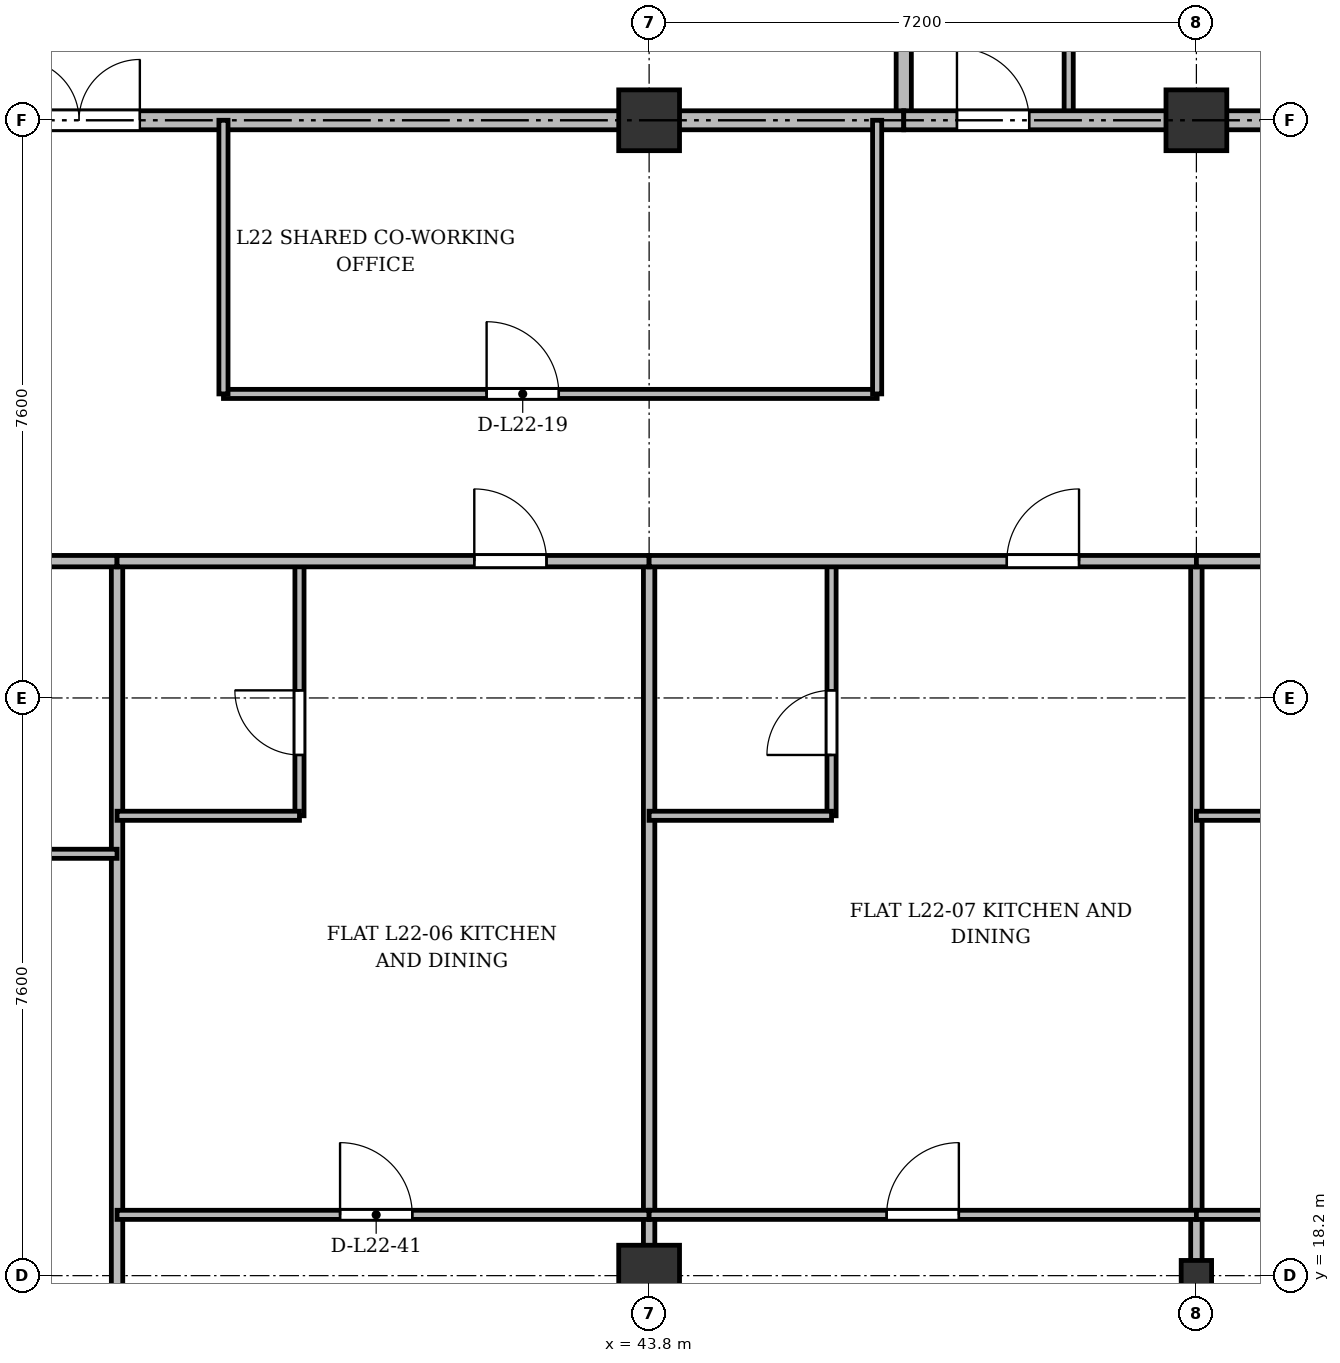
"""IFC4 building model, lengths in metres.
Left out: names, types, materials, properties, quantities, classifications, styles, units other than length and angle.
Written with IfcOpenShell. Run it as: python <this file> out.ifc"""

import sys

from ifc_helpers import new_model, si_unit, direction, frame, frame_2d, origin, origin_2d, place, context, subcontext, project, spatial, rectangle, i_section, extrude, source, transform, mapped, element, fill, save


model = new_model("IFC4")
c1 = context("Model", 3, precision=1e-05, world=origin(), true_north=direction((0.0, 1.0)))
c2 = subcontext(c1, "Body", "Model", "MODEL_VIEW")
j1 = project(units=[si_unit("LENGTHUNIT", "METRE"), si_unit("PLANEANGLEUNIT", "RADIAN")], contexts=[c1])
p1 = place(None, origin())
s1 = spatial("IfcSite", under=j1, at=p1, CompositionType="ELEMENT")
p2 = place(p1, origin())
s2 = spatial("IfcBuilding", under=s1, at=p2, CompositionType="ELEMENT")
p3 = place(p2, frame((0.0, 0.0, 88.9)))
s3 = spatial("IfcBuildingStorey", under=s2, at=p3, CompositionType="ELEMENT", Elevation=88.9)
m1 = source(origin(), c2, "Body", "SweptSolid", [
    extrude(rectangle(XDim=0.8, YDim=0.8, at=origin_2d()), origin(), (0.0, 0.0, 1.0), 3.6),
])
for number, where, z_axis, x_axis in (
    (1, (43.8, 18.2, 0.0), (0.0, 0.0, 1.0), (1.0, 0.0, 0.0)),
    (2, (43.8, 33.4, 0.0), (0.0, 0.0, 1.0), (1.0, 0.0, 0.0)),
):
    element("IfcColumn", number, at=place(p3, frame(where, z_axis=z_axis, x_axis=x_axis)), inside=s3, PredefinedType="COLUMN", context=c2, shape_type="MappedRepresentation", body=[
        mapped(m1, transform((0.0, 0.0, 0.0), x_axis=(1.0, 0.0, 0.0), y_axis=(0.0, 1.0, 0.0), z_axis=(0.0, 0.0, 1.0), scale=1.0)),
    ])
m2 = source(origin(), c2, "Body", "SweptSolid", [
    extrude(i_section(OverallWidth=0.4, OverallDepth=0.4, WebThickness=0.022, FlangeThickness=0.035, at=origin_2d()), origin(), (0.0, 0.0, 1.0), 3.6),
])
p4 = place(p3, frame((51.0, 18.2, 0.0), z_axis=(0.0, 0.0, 1.0), x_axis=(1.0, 0.0, 0.0)))
e3 = element("IfcColumn", 3, at=p4, inside=s3, PredefinedType="COLUMN", context=c2, shape_type="MappedRepresentation", body=[
    mapped(m2, transform((0.0, 0.0, 0.0), x_axis=(1.0, 0.0, 0.0), y_axis=(0.0, 1.0, 0.0), z_axis=(0.0, 0.0, 1.0), scale=1.0)),
])
p5 = place(p3, frame((51.0, 33.4, 0.0), z_axis=(0.0, 0.0, 1.0), x_axis=(1.0, 0.0, 0.0)))
e4 = element("IfcColumn", 4, at=p5, inside=s3, PredefinedType="COLUMN", context=c2, shape_type="MappedRepresentation", body=[
    mapped(m1, transform((0.0, 0.0, 0.0), x_axis=(1.0, 0.0, 0.0), y_axis=(0.0, 1.0, 0.0), z_axis=(0.0, 0.0, 1.0), scale=1.0)),
])
p6 = place(p3, frame((47.15, 33.4, 0.0), z_axis=(0.0, 0.0, 1.0), x_axis=(0.0, 1.0, 0.0)))
e5 = element("IfcWall", 5, at=p6, inside=s3, PredefinedType="SOLIDWALL", context=c2, shape_type="SweptSolid", body=[
    extrude(rectangle(XDim=11.3, YDim=0.2, at=frame_2d((5.65, 0.0))), origin(), (0.0, 0.0, 1.0), 2.752),
])
p7 = place(p3, frame((26.3, 33.4, 0.0), z_axis=(0.0, 0.0, 1.0), x_axis=(1.0, 0.0, 0.0)))
e6 = element("IfcWall", 6, at=p7, inside=s3, PredefinedType="PARTITIONING", context=c2, shape_type="SweptSolid", body=[
    extrude(rectangle(XDim=20.85, YDim=0.25, at=frame_2d((10.425, 0.0))), origin(), (0.0, 0.0, 1.0), 2.752),
])
p8 = place(p7, frame((9.2, 0.0, 0.0)))
e7 = element("IfcOpeningElement", 7, at=p8, cuts=e6, PredefinedType="OPENING", context=c2, shape_type="SweptSolid", body=[
    extrude(rectangle(XDim=1.6, YDim=2.2, at=frame_2d((0.8, 1.1))), frame((0.0, 0.135, 0.0), z_axis=(0.0, -1.0, 0.0), x_axis=(1.0, 0.0, 0.0)), (0.0, 0.0, 1.0), 0.27),
])
p9 = place(p3, frame((49.32, 33.4, 0.0), z_axis=(0.0, 0.0, 1.0), x_axis=(0.0, 1.0, 0.0)))
e8 = element("IfcWall", 8, at=p9, inside=s3, PredefinedType="PARTITIONING", context=c2, shape_type="SweptSolid", body=[
    extrude(rectangle(XDim=5.42, YDim=0.12, at=frame_2d((2.71, 0.0))), origin(), (0.0, 0.0, 1.0), 2.752),
])
p10 = place(p9, frame((1.6, 0.0, 0.0)))
e9 = element("IfcOpeningElement", 9, at=p10, cuts=e8, PredefinedType="OPENING", context=c2, shape_type="SweptSolid", body=[
    extrude(rectangle(XDim=0.95, YDim=2.15, at=frame_2d((0.475, 1.075))), frame((0.0, 0.07, 0.0), z_axis=(0.0, -1.0, 0.0), x_axis=(1.0, 0.0, 0.0)), (0.0, 0.0, 1.0), 0.14),
])
p11 = place(p3, frame((47.15, 33.4, 0.0), z_axis=(0.0, 0.0, 1.0), x_axis=(1.0, 0.0, 0.0)))
e10 = element("IfcWall", 10, at=p11, inside=s3, PredefinedType="PARTITIONING", context=c2, shape_type="SweptSolid", body=[
    extrude(rectangle(XDim=11.15, YDim=0.25, at=frame_2d((5.575, 0.0))), origin(), (0.0, 0.0, 1.0), 2.752),
])
p12 = place(p11, frame((0.7, 0.0, 0.0)))
e11 = element("IfcOpeningElement", 11, at=p12, cuts=e10, PredefinedType="OPENING", context=c2, shape_type="SweptSolid", body=[
    extrude(rectangle(XDim=0.95, YDim=2.15, at=frame_2d((0.475, 1.075))), frame((0.0, 0.135, 0.0), z_axis=(0.0, -1.0, 0.0), x_axis=(1.0, 0.0, 0.0)), (0.0, 0.0, 1.0), 0.27),
])
p13 = place(p11, frame((6.0, 0.0, 0.0)))
e12 = element("IfcOpeningElement", 12, at=p13, cuts=e10, PredefinedType="OPENING", context=c2, shape_type="SweptSolid", body=[
    extrude(rectangle(XDim=1.2, YDim=2.15, at=frame_2d((0.6, 1.075))), frame((0.0, 0.135, 0.0), z_axis=(0.0, -1.0, 0.0), x_axis=(1.0, 0.0, 0.0)), (0.0, 0.0, 1.0), 0.27),
])
p14 = place(p3, frame((38.2, 29.8, 0.0), z_axis=(0.0, 0.0, 1.0), x_axis=(1.0, 0.0, 0.0)))
e13 = element("IfcWall", 13, at=p14, inside=s3, PredefinedType="PARTITIONING", context=c2, shape_type="SweptSolid", body=[
    extrude(rectangle(XDim=8.6, YDim=0.12, at=frame_2d((4.3, 0.0))), origin(), (0.0, 0.0, 1.0), 2.84),
])
p15 = place(p14, frame((3.462, 0.0, 0.0)))
e14 = element("IfcOpeningElement", 14, at=p15, cuts=e13, PredefinedType="OPENING", context=c2, shape_type="SweptSolid", body=[
    extrude(rectangle(XDim=0.95, YDim=2.15, at=frame_2d((0.475, 1.075))), frame((0.0, 0.07, 0.0), z_axis=(0.0, -1.0, 0.0), x_axis=(1.0, 0.0, 0.0)), (0.0, 0.0, 1.0), 0.14),
])
for number, where, z_axis, x_axis in (
    (15, (38.2, 29.8, 0.0), (0.0, 0.0, 1.0), (0.0, 1.0, 0.0)),
    (16, (46.8, 29.8, 0.0), (0.0, 0.0, 1.0), (0.0, 1.0, 0.0)),
):
    element("IfcWall", number, at=place(p3, frame(where, z_axis=z_axis, x_axis=x_axis)), inside=s3, PredefinedType="PARTITIONING", context=c2, shape_type="SweptSolid", body=[
        extrude(rectangle(XDim=3.6, YDim=0.12, at=frame_2d((1.8, 0.0))), origin(), (0.0, 0.0, 1.0), 2.752),
    ])
p16 = place(p3, frame((36.8, 3.145, 0.0), z_axis=(0.0, 0.0, 1.0), x_axis=(0.0, 1.0, 0.0)))
e17 = element("IfcWall", 17, at=p16, inside=s3, PredefinedType="PARTITIONING", context=c2, shape_type="SweptSolid", body=[
    extrude(rectangle(XDim=24.455, YDim=0.15, at=frame_2d((12.228, 0.0))), origin(), (0.0, 0.0, 1.0), 2.752),
])
for number, where, z_axis, x_axis in (
    (18, (43.8, 3.145, 0.0), (0.0, 0.0, 1.0), (0.0, 1.0, 0.0)),
    (19, (51.0, 3.145, 0.0), (0.0, 0.0, 1.0), (0.0, 1.0, 0.0)),
):
    element("IfcWall", number, at=place(p3, frame(where, z_axis=z_axis, x_axis=x_axis)), inside=s3, PredefinedType="PARTITIONING", context=c2, shape_type="SweptSolid", body=[
        extrude(rectangle(XDim=24.455, YDim=0.15, at=frame_2d((12.228, 0.0))), origin(), (0.0, 0.0, 1.0), 2.84),
    ])
p17 = place(p3, frame((30.6, 27.6, 0.0), z_axis=(0.0, 0.0, 1.0), x_axis=(1.0, 0.0, 0.0)))
e20 = element("IfcWall", 20, at=p17, inside=s3, PredefinedType="PARTITIONING", context=c2, shape_type="SweptSolid", body=[
    extrude(rectangle(XDim=6.2, YDim=0.15, at=frame_2d((3.1, 0.0))), origin(), (0.0, 0.0, 1.0), 2.84),
])
p18 = place(p17, frame((2.625, 0.0, 0.0)))
e21 = element("IfcOpeningElement", 21, at=p18, cuts=e20, PredefinedType="OPENING", context=c2, shape_type="SweptSolid", body=[
    extrude(rectangle(XDim=0.95, YDim=2.15, at=frame_2d((0.475, 1.075))), frame((0.0, 0.085, 0.0), z_axis=(0.0, -1.0, 0.0), x_axis=(1.0, 0.0, 0.0)), (0.0, 0.0, 1.0), 0.17),
])
p19 = place(p3, frame((30.6, 23.75, 0.0), z_axis=(0.0, 0.0, 1.0), x_axis=(1.0, 0.0, 0.0)))
e22 = element("IfcWall", 22, at=p19, inside=s3, PredefinedType="PARTITIONING", context=c2, shape_type="SweptSolid", body=[
    extrude(rectangle(XDim=6.2, YDim=0.12, at=frame_2d((3.1, 0.0))), origin(), (0.0, 0.0, 1.0), 2.84),
])
p20 = place(p19, frame((2.625, 0.0, 0.0)))
e23 = element("IfcOpeningElement", 23, at=p20, cuts=e22, PredefinedType="OPENING", context=c2, shape_type="SweptSolid", body=[
    extrude(rectangle(XDim=0.95, YDim=2.15, at=frame_2d((0.475, 1.075))), frame((0.0, 0.07, 0.0), z_axis=(0.0, -1.0, 0.0), x_axis=(1.0, 0.0, 0.0)), (0.0, 0.0, 1.0), 0.14),
])
p21 = place(p3, frame((36.8, 19.0, 0.0), z_axis=(0.0, 0.0, 1.0), x_axis=(1.0, 0.0, 0.0)))
e24 = element("IfcWall", 24, at=p21, inside=s3, PredefinedType="PARTITIONING", context=c2, shape_type="SweptSolid", body=[
    extrude(rectangle(XDim=7.0, YDim=0.12, at=frame_2d((3.5, 0.0))), origin(), (0.0, 0.0, 1.0), 2.84),
])
p22 = place(p21, frame((2.934, 0.0, 0.0)))
e25 = element("IfcOpeningElement", 25, at=p22, cuts=e24, PredefinedType="OPENING", context=c2, shape_type="SweptSolid", body=[
    extrude(rectangle(XDim=0.95, YDim=2.15, at=frame_2d((0.475, 1.075))), frame((0.0, 0.07, 0.0), z_axis=(0.0, -1.0, 0.0), x_axis=(1.0, 0.0, 0.0)), (0.0, 0.0, 1.0), 0.14),
])
p23 = place(p3, frame((39.2, 24.25, 0.0), z_axis=(0.0, 0.0, 1.0), x_axis=(0.0, 1.0, 0.0)))
e26 = element("IfcWall", 26, at=p23, inside=s3, PredefinedType="PARTITIONING", context=c2, shape_type="SweptSolid", body=[
    extrude(rectangle(XDim=3.35, YDim=0.12, at=frame_2d((1.675, 0.0))), origin(), (0.0, 0.0, 1.0), 2.99),
])
p24 = place(p23, frame((0.8, 0.0, 0.0)))
e27 = element("IfcOpeningElement", 27, at=p24, cuts=e26, PredefinedType="OPENING", context=c2, shape_type="SweptSolid", body=[
    extrude(rectangle(XDim=0.85, YDim=2.1, at=frame_2d((0.425, 1.05))), frame((0.0, 0.07, 0.0), z_axis=(0.0, -1.0, 0.0), x_axis=(1.0, 0.0, 0.0)), (0.0, 0.0, 1.0), 0.14),
])
p25 = place(p3, frame((36.8, 24.25, 0.0), z_axis=(0.0, 0.0, 1.0), x_axis=(1.0, 0.0, 0.0)))
e28 = element("IfcWall", 28, at=p25, inside=s3, PredefinedType="PARTITIONING", context=c2, shape_type="SweptSolid", body=[
    extrude(rectangle(XDim=2.4, YDim=0.12, at=frame_2d((1.2, 0.0))), origin(), (0.0, 0.0, 1.0), 3.34),
])
p26 = place(p3, frame((36.8, 27.6, 0.0), z_axis=(0.0, 0.0, 1.0), x_axis=(1.0, 0.0, 0.0)))
e29 = element("IfcWall", 29, at=p26, inside=s3, PredefinedType="PARTITIONING", context=c2, shape_type="SweptSolid", body=[
    extrude(rectangle(XDim=7.0, YDim=0.15, at=frame_2d((3.5, 0.0))), origin(), (0.0, 0.0, 1.0), 2.84),
])
p27 = place(p26, frame((4.7, 0.0, 0.0)))
e30 = element("IfcOpeningElement", 30, at=p27, cuts=e29, PredefinedType="OPENING", context=c2, shape_type="SweptSolid", body=[
    extrude(rectangle(XDim=0.95, YDim=2.15, at=frame_2d((0.475, 1.075))), frame((0.0, 0.085, 0.0), z_axis=(0.0, -1.0, 0.0), x_axis=(1.0, 0.0, 0.0)), (0.0, 0.0, 1.0), 0.17),
])
p28 = place(p3, frame((43.8, 19.0, 0.0), z_axis=(0.0, 0.0, 1.0), x_axis=(1.0, 0.0, 0.0)))
e31 = element("IfcWall", 31, at=p28, inside=s3, PredefinedType="PARTITIONING", context=c2, shape_type="SweptSolid", body=[
    extrude(rectangle(XDim=7.2, YDim=0.12, at=frame_2d((3.6, 0.0))), origin(), (0.0, 0.0, 1.0), 2.84),
])
p29 = place(p28, frame((3.125, 0.0, 0.0)))
e32 = element("IfcOpeningElement", 32, at=p29, cuts=e31, PredefinedType="OPENING", context=c2, shape_type="SweptSolid", body=[
    extrude(rectangle(XDim=0.95, YDim=2.15, at=frame_2d((0.475, 1.075))), frame((0.0, 0.07, 0.0), z_axis=(0.0, -1.0, 0.0), x_axis=(1.0, 0.0, 0.0)), (0.0, 0.0, 1.0), 0.14),
])
p30 = place(p3, frame((46.2, 24.25, 0.0), z_axis=(0.0, 0.0, 1.0), x_axis=(0.0, 1.0, 0.0)))
e33 = element("IfcWall", 33, at=p30, inside=s3, PredefinedType="PARTITIONING", context=c2, shape_type="SweptSolid", body=[
    extrude(rectangle(XDim=3.35, YDim=0.12, at=frame_2d((1.675, 0.0))), origin(), (0.0, 0.0, 1.0), 2.99),
])
p31 = place(p30, frame((0.8, 0.0, 0.0)))
e34 = element("IfcOpeningElement", 34, at=p31, cuts=e33, PredefinedType="OPENING", context=c2, shape_type="SweptSolid", body=[
    extrude(rectangle(XDim=0.85, YDim=2.1, at=frame_2d((0.425, 1.05))), frame((0.0, 0.07, 0.0), z_axis=(0.0, -1.0, 0.0), x_axis=(1.0, 0.0, 0.0)), (0.0, 0.0, 1.0), 0.14),
])
p32 = place(p3, frame((43.8, 24.25, 0.0), z_axis=(0.0, 0.0, 1.0), x_axis=(1.0, 0.0, 0.0)))
e35 = element("IfcWall", 35, at=p32, inside=s3, PredefinedType="PARTITIONING", context=c2, shape_type="SweptSolid", body=[
    extrude(rectangle(XDim=2.4, YDim=0.12, at=frame_2d((1.2, 0.0))), origin(), (0.0, 0.0, 1.0), 2.84),
])
p33 = place(p3, frame((43.8, 27.6, 0.0), z_axis=(0.0, 0.0, 1.0), x_axis=(1.0, 0.0, 0.0)))
e36 = element("IfcWall", 36, at=p33, inside=s3, PredefinedType="PARTITIONING", context=c2, shape_type="SweptSolid", body=[
    extrude(rectangle(XDim=7.2, YDim=0.15, at=frame_2d((3.6, 0.0))), origin(), (0.0, 0.0, 1.0), 2.84),
])
p34 = place(p33, frame((4.706, 0.0, 0.0)))
e37 = element("IfcOpeningElement", 37, at=p34, cuts=e36, PredefinedType="OPENING", context=c2, shape_type="SweptSolid", body=[
    extrude(rectangle(XDim=0.95, YDim=2.15, at=frame_2d((0.475, 1.075))), frame((0.0, 0.085, 0.0), z_axis=(0.0, -1.0, 0.0), x_axis=(1.0, 0.0, 0.0)), (0.0, 0.0, 1.0), 0.17),
])
p35 = place(p3, frame((51.0, 19.0, 0.0), z_axis=(0.0, 0.0, 1.0), x_axis=(1.0, 0.0, 0.0)))
e38 = element("IfcWall", 38, at=p35, inside=s3, PredefinedType="PARTITIONING", context=c2, shape_type="SweptSolid", body=[
    extrude(rectangle(XDim=7.8, YDim=0.12, at=frame_2d((3.9, 0.0))), origin(), (0.0, 0.0, 1.0), 2.84),
])
p36 = place(p35, frame((3.333, 0.0, 0.0)))
e39 = element("IfcOpeningElement", 39, at=p36, cuts=e38, PredefinedType="OPENING", context=c2, shape_type="SweptSolid", body=[
    extrude(rectangle(XDim=0.95, YDim=2.15, at=frame_2d((0.475, 1.075))), frame((0.0, 0.07, 0.0), z_axis=(0.0, -1.0, 0.0), x_axis=(1.0, 0.0, 0.0)), (0.0, 0.0, 1.0), 0.14),
])
p37 = place(p3, frame((51.0, 24.25, 0.0), z_axis=(0.0, 0.0, 1.0), x_axis=(1.0, 0.0, 0.0)))
e40 = element("IfcWall", 40, at=p37, inside=s3, PredefinedType="PARTITIONING", context=c2, shape_type="SweptSolid", body=[
    extrude(rectangle(XDim=2.4, YDim=0.12, at=frame_2d((1.2, 0.0))), origin(), (0.0, 0.0, 1.0), 2.84),
])
p38 = place(p3, frame((51.0, 27.6, 0.0), z_axis=(0.0, 0.0, 1.0), x_axis=(1.0, 0.0, 0.0)))
e41 = element("IfcWall", 41, at=p38, inside=s3, PredefinedType="PARTITIONING", context=c2, shape_type="SweptSolid", body=[
    extrude(rectangle(XDim=7.8, YDim=0.15, at=frame_2d((3.9, 0.0))), origin(), (0.0, 0.0, 1.0), 2.84),
])
p39 = place(p38, frame((5.172, 0.0, 0.0)))
e42 = element("IfcOpeningElement", 42, at=p39, cuts=e41, PredefinedType="OPENING", context=c2, shape_type="SweptSolid", body=[
    extrude(rectangle(XDim=0.95, YDim=2.15, at=frame_2d((0.475, 1.075))), frame((0.0, 0.085, 0.0), z_axis=(0.0, -1.0, 0.0), x_axis=(1.0, 0.0, 0.0)), (0.0, 0.0, 1.0), 0.17),
])
m3 = source(origin(), c2, "Body", "SweptSolid", [
    extrude(rectangle(XDim=1.6, YDim=2.2, at=frame_2d((0.8, 1.1))), frame((0.0, 0.025, 0.0), z_axis=(0.0, -1.0, 0.0), x_axis=(1.0, 0.0, 0.0)), (0.0, 0.0, 1.0), 0.05),
])
p40 = place(p8, origin())
e43 = element("IfcDoor", 43, at=p40, inside=s3, OperationType="DOUBLE_DOOR_SINGLE_SWING", PredefinedType="DOOR", context=c2, shape_type="MappedRepresentation", body=[
    mapped(m3, transform((0.0, 0.0, 0.0), x_axis=(1.0, 0.0, 0.0), y_axis=(0.0, 1.0, 0.0), z_axis=(0.0, 0.0, 1.0), scale=1.0)),
])
fill(e7, e43)
m4 = source(origin(), c2, "Body", "SweptSolid", [
    extrude(rectangle(XDim=0.95, YDim=2.15, at=frame_2d((0.475, 1.075))), frame((0.0, 0.025, 0.0), z_axis=(0.0, -1.0, 0.0), x_axis=(1.0, 0.0, 0.0)), (0.0, 0.0, 1.0), 0.05),
])
p41 = place(p12, origin())
e44 = element("IfcDoor", 44, at=p41, inside=s3, OperationType="SINGLE_SWING_LEFT", PredefinedType="DOOR", context=c2, shape_type="MappedRepresentation", body=[
    mapped(m4, transform((0.0, 0.0, 0.0), x_axis=(1.0, 0.0, 0.0), y_axis=(0.0, 1.0, 0.0), z_axis=(0.0, 0.0, 1.0), scale=1.0)),
])
fill(e11, e44)
p42 = place(p15, origin())
e45 = element("IfcDoor", 45, at=p42, inside=s3, OperationType="SINGLE_SWING_LEFT", PredefinedType="DOOR", context=c2, shape_type="MappedRepresentation", body=[
    mapped(m4, transform((0.0, 0.0, 0.0), x_axis=(1.0, 0.0, 0.0), y_axis=(0.0, 1.0, 0.0), z_axis=(0.0, 0.0, 1.0), scale=1.0)),
])
fill(e14, e45)
p43 = place(p22, origin())
e46 = element("IfcDoor", 46, at=p43, inside=s3, OperationType="SINGLE_SWING_LEFT", PredefinedType="DOOR", context=c2, shape_type="MappedRepresentation", body=[
    mapped(m4, transform((0.0, 0.0, 0.0), x_axis=(1.0, 0.0, 0.0), y_axis=(0.0, 1.0, 0.0), z_axis=(0.0, 0.0, 1.0), scale=1.0)),
])
fill(e25, e46)
m5 = source(origin(), c2, "Body", "SweptSolid", [
    extrude(rectangle(XDim=0.85, YDim=2.1, at=frame_2d((0.425, 1.05))), frame((0.0, 0.025, 0.0), z_axis=(0.0, -1.0, 0.0), x_axis=(1.0, 0.0, 0.0)), (0.0, 0.0, 1.0), 0.05),
])
p44 = place(p24, origin())
e47 = element("IfcDoor", 47, at=p44, inside=s3, OperationType="SINGLE_SWING_RIGHT", PredefinedType="DOOR", context=c2, shape_type="MappedRepresentation", body=[
    mapped(m5, transform((0.0, 0.0, 0.0), x_axis=(1.0, 0.0, 0.0), y_axis=(0.0, 1.0, 0.0), z_axis=(0.0, 0.0, 1.0), scale=1.0)),
])
fill(e27, e47)
p45 = place(p27, origin())
e48 = element("IfcDoor", 48, at=p45, inside=s3, OperationType="SINGLE_SWING_LEFT", PredefinedType="DOOR", context=c2, shape_type="MappedRepresentation", body=[
    mapped(m4, transform((0.0, 0.0, 0.0), x_axis=(1.0, 0.0, 0.0), y_axis=(0.0, 1.0, 0.0), z_axis=(0.0, 0.0, 1.0), scale=1.0)),
])
fill(e30, e48)
p46 = place(p29, origin())
e49 = element("IfcDoor", 49, at=p46, inside=s3, OperationType="SINGLE_SWING_RIGHT", PredefinedType="DOOR", context=c2, shape_type="MappedRepresentation", body=[
    mapped(m4, transform((0.0, 0.0, 0.0), x_axis=(1.0, 0.0, 0.0), y_axis=(0.0, 1.0, 0.0), z_axis=(0.0, 0.0, 1.0), scale=1.0)),
])
fill(e32, e49)
p47 = place(p31, origin())
e50 = element("IfcDoor", 50, at=p47, inside=s3, OperationType="SINGLE_SWING_LEFT", PredefinedType="DOOR", context=c2, shape_type="MappedRepresentation", body=[
    mapped(m5, transform((0.0, 0.0, 0.0), x_axis=(1.0, 0.0, 0.0), y_axis=(0.0, 1.0, 0.0), z_axis=(0.0, 0.0, 1.0), scale=1.0)),
])
fill(e34, e50)
p48 = place(p34, origin())
e51 = element("IfcDoor", 51, at=p48, inside=s3, OperationType="SINGLE_SWING_RIGHT", PredefinedType="DOOR", context=c2, shape_type="MappedRepresentation", body=[
    mapped(m4, transform((0.0, 0.0, 0.0), x_axis=(1.0, 0.0, 0.0), y_axis=(0.0, 1.0, 0.0), z_axis=(0.0, 0.0, 1.0), scale=1.0)),
])
fill(e37, e51)
save(model, sys.argv[1])
